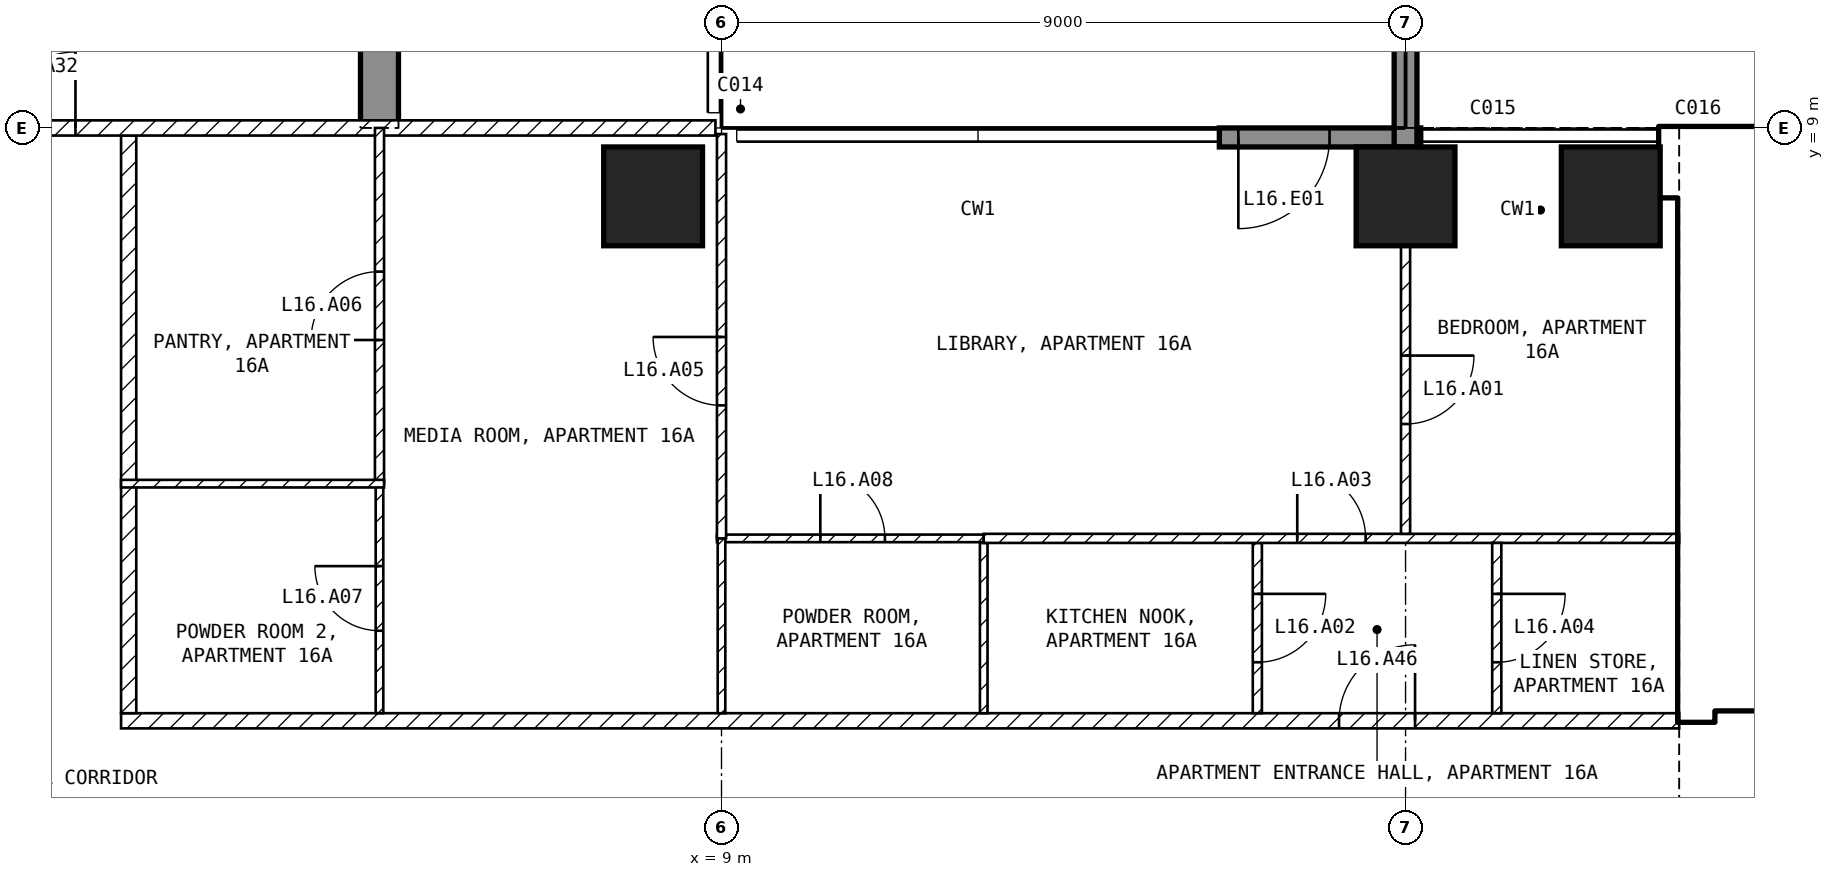
"""IFC4 building model, lengths in metres.
Left out: names, types, materials, properties, quantities, classifications, styles, units other than length and angle.
Written with IfcOpenShell. Run it as: python <this file> out.ifc"""

import sys

from ifc_helpers import new_model, si_unit, direction, frame, frame_2d, origin, origin_2d, place, context, subcontext, project, spatial, polyline, rectangle, outline, extrude, element, fill, save


model = new_model("IFC4")
c1 = context("Model", 3, precision=1e-05, world=origin(), true_north=direction((0.0, 1.0)))
c2 = subcontext(c1, "Body", "Model", "MODEL_VIEW")
j1 = project(units=[si_unit("LENGTHUNIT", "METRE"), si_unit("PLANEANGLEUNIT", "RADIAN")], contexts=[c1])
p1 = place(None, origin())
s1 = spatial("IfcSite", under=j1, at=p1, CompositionType="ELEMENT")
p2 = place(p1, origin())
s2 = spatial("IfcBuilding", under=s1, at=p2, CompositionType="ELEMENT")
p3 = place(p2, frame((0.0, 0.0, 75.0)))
s3 = spatial("IfcBuildingStorey", under=s2, at=p3, CompositionType="ELEMENT", Elevation=75.0)
for number, where, z_axis, x_axis in (
    (1, (8.1, 8.1, -0.25), (0.0, 0.0, 1.0), (1.0, 0.0, 0.0)),
    (2, (18.0, 8.1, -0.25), (0.0, 0.0, 1.0), (1.0, 0.0, 0.0)),
    (3, (20.7, 8.1, -0.25), (0.0, 0.0, 1.0), (1.0, 0.0, 0.0)),
):
    element("IfcColumn", number, at=place(p3, frame(where, z_axis=z_axis, x_axis=x_axis)), inside=s3, PredefinedType="COLUMN", context=c2, shape_type="SweptSolid", body=[
        extrude(rectangle(XDim=1.3, YDim=1.3, at=origin_2d()), origin(), (0.0, 0.0, 1.0), 3.5),
    ])
p4 = place(p3, frame((4.25, 9.0, -0.25), z_axis=(1.0, 0.0, 0.0), x_axis=(0.0, 1.0, 0.0)))
e4 = element("IfcWall", 4, at=p4, inside=s3, PredefinedType="SHEAR", context=c2, shape_type="SweptSolid", body=[
    extrude(outline(polyline([(0.0, 0.0), (2.1, 0.0), (2.1, 2.65), (4.5, 2.65), (4.5, 0.0), (9.9, 0.0), (9.9, 2.65), (12.3, 2.65), (12.3, 0.0), (16.45, 0.0), (16.45, 3.5), (0.0, 3.5), (0.0, 0.0)])), origin(), (0.0, 0.0, 1.0), 0.5),
])
p5 = place(p3, frame((18.2, 8.875, 0.0), z_axis=(0.0, 0.0, 1.0), x_axis=(-1.0, 0.0, 0.0)))
e5 = element("IfcWall", 5, at=p5, inside=s3, PredefinedType="SOLIDWALL", context=c2, shape_type="SweptSolid", body=[
    extrude(rectangle(XDim=2.65, YDim=0.25, at=frame_2d((1.325, 0.0))), origin(), (0.0, 0.0, 1.0), 3.25),
])
p6 = place(p5, frame((1.2, 0.0, 0.0)))
e6 = element("IfcOpeningElement", 6, at=p6, cuts=e5, PredefinedType="OPENING", context=c2, shape_type="SweptSolid", body=[
    extrude(rectangle(XDim=1.2, YDim=2.4, at=frame_2d((0.6, 1.2))), frame((0.0, 0.135, 0.0), z_axis=(0.0, -1.0, 0.0), x_axis=(1.0, 0.0, 0.0)), (0.0, 0.0, 1.0), 0.27),
])
p7 = place(p3, frame((18.0, 8.75, 0.0), z_axis=(0.0, 0.0, 1.0), x_axis=(0.0, 1.0, 0.0)))
e7 = element("IfcWall", 7, at=p7, inside=s3, PredefinedType="SOLIDWALL", context=c2, shape_type="SweptSolid", body=[
    extrude(rectangle(XDim=2.95, YDim=0.3, at=frame_2d((1.475, 0.0))), origin(), (0.0, 0.0, 1.0), 3.25),
])
p8 = place(p3, frame((21.35, 8.55, 0.0), z_axis=(0.0, 0.0, 1.0), x_axis=(1.0, 0.0, 0.0)))
e8 = element("IfcWall", 8, at=p8, inside=s3, PredefinedType="SHEAR", context=c2, shape_type="SweptSolid", body=[
    extrude(rectangle(XDim=10.15, YDim=0.9, at=frame_2d((5.075, 0.0))), origin(), (0.0, 0.0, 1.0), 3.25),
])
p9 = place(p3, frame((21.825, 1.2, 0.0), z_axis=(0.0, 0.0, 1.0), x_axis=(0.0, 1.0, 0.0)))
e9 = element("IfcWall", 9, at=p9, inside=s3, PredefinedType="SHEAR", context=c2, shape_type="SweptSolid", body=[
    extrude(rectangle(XDim=6.9, YDim=0.45, at=frame_2d((3.45, 0.0))), origin(), (0.0, 0.0, 1.0), 3.25),
])
p10 = place(p3, frame((22.05, 1.45, 0.0), z_axis=(0.0, 0.0, 1.0), x_axis=(1.0, 0.0, 0.0)))
e10 = element("IfcWall", 10, at=p10, inside=s3, PredefinedType="SOLIDWALL", context=c2, shape_type="SweptSolid", body=[
    extrude(rectangle(XDim=13.05, YDim=0.2, at=frame_2d((6.525, 0.0))), origin(), (0.0, 0.0, 1.0), 3.25),
])
p11 = place(p10, frame((0.75, 0.0, 0.0)))
e11 = element("IfcOpeningElement", 11, at=p11, cuts=e10, PredefinedType="OPENING", context=c2, shape_type="SweptSolid", body=[
    extrude(rectangle(XDim=1.0, YDim=2.1, at=frame_2d((0.5, 1.05))), frame((0.0, 0.11, 0.0), z_axis=(0.0, -1.0, 0.0), x_axis=(1.0, 0.0, 0.0)), (0.0, 0.0, 1.0), 0.22),
])
p12 = place(p10, frame((3.25, 0.0, 0.0)))
e12 = element("IfcOpeningElement", 12, at=p12, cuts=e10, PredefinedType="OPENING", context=c2, shape_type="SweptSolid", body=[
    extrude(rectangle(XDim=1.0, YDim=2.1, at=frame_2d((0.5, 1.05))), frame((0.0, 0.11, 0.0), z_axis=(0.0, -1.0, 0.0), x_axis=(1.0, 0.0, 0.0)), (0.0, 0.0, 1.0), 0.22),
])
p13 = place(p3, frame((22.05, 5.15, 0.0), z_axis=(0.0, 0.0, 1.0), x_axis=(1.0, 0.0, 0.0)))
e13 = element("IfcWall", 13, at=p13, inside=s3, PredefinedType="SOLIDWALL", context=c2, shape_type="SweptSolid", body=[
    extrude(rectangle(XDim=6.3, YDim=0.2, at=frame_2d((3.15, 0.0))), origin(), (0.0, 0.0, 1.0), 3.25),
])
p14 = place(p13, frame((0.2, 0.0, 0.0)))
e14 = element("IfcOpeningElement", 14, at=p14, cuts=e13, PredefinedType="OPENING", context=c2, shape_type="SweptSolid", body=[
    extrude(rectangle(XDim=1.0, YDim=2.1, at=frame_2d((0.5, 1.05))), frame((0.0, 0.11, 0.0), z_axis=(0.0, -1.0, 0.0), x_axis=(1.0, 0.0, 0.0)), (0.0, 0.0, 1.0), 0.22),
])
p15 = place(p3, frame((1.1, 1.2, 0.0), z_axis=(0.0, 0.0, 1.0), x_axis=(1.0, 0.0, 0.0)))
e15 = element("IfcWall", 15, at=p15, inside=s3, PredefinedType="PARTITIONING", context=c2, shape_type="SweptSolid", body=[
    extrude(rectangle(XDim=20.5, YDim=0.2, at=frame_2d((10.25, 0.0))), origin(), (0.0, 0.0, 1.0), 3.25),
])
p16 = place(p15, frame((16.025, 0.0, 0.0)))
e16 = element("IfcOpeningElement", 16, at=p16, cuts=e15, PredefinedType="OPENING", context=c2, shape_type="SweptSolid", body=[
    extrude(rectangle(XDim=1.0, YDim=2.1, at=frame_2d((0.5, 1.05))), frame((0.0, 0.11, 0.0), z_axis=(0.0, -1.0, 0.0), x_axis=(1.0, 0.0, 0.0)), (0.0, 0.0, 1.0), 0.22),
])
p17 = place(p3, frame((1.2, 8.9, 0.0), z_axis=(0.0, 0.0, 1.0), x_axis=(0.0, -1.0, 0.0)))
e17 = element("IfcWall", 17, at=p17, inside=s3, PredefinedType="PARTITIONING", context=c2, shape_type="SweptSolid", body=[
    extrude(rectangle(XDim=7.6, YDim=0.2, at=frame_2d((3.8, 0.0))), origin(), (0.0, 0.0, 1.0), 3.25),
])
p18 = place(p3, frame((-8.92, 9.0, 0.0), z_axis=(0.0, 0.0, 1.0), x_axis=(1.0, 0.0, 0.0)))
e18 = element("IfcWall", 18, at=p18, inside=s3, PredefinedType="PARTITIONING", context=c2, shape_type="SweptSolid", body=[
    extrude(rectangle(XDim=17.84, YDim=0.2, at=frame_2d((8.92, 0.0))), origin(), (0.0, 0.0, 1.0), 3.25),
])
p19 = place(p18, frame((8.42, 0.0, 0.0)))
e19 = element("IfcOpeningElement", 19, at=p19, cuts=e18, PredefinedType="OPENING", context=c2, shape_type="SweptSolid", body=[
    extrude(rectangle(XDim=1.0, YDim=2.1, at=frame_2d((0.5, 1.05))), frame((0.0, 0.11, 0.0), z_axis=(0.0, -1.0, 0.0), x_axis=(1.0, 0.0, 0.0)), (0.0, 0.0, 1.0), 0.22),
])
p20 = place(p3, frame((12.45, 3.54, 0.0), z_axis=(0.0, 0.0, 1.0), x_axis=(0.0, -1.0, 0.0)))
e20 = element("IfcWall", 20, at=p20, inside=s3, PredefinedType="PARTITIONING", context=c2, shape_type="SweptSolid", body=[
    extrude(rectangle(XDim=2.24, YDim=0.1, at=frame_2d((1.12, 0.0))), origin(), (0.0, 0.0, 1.0), 3.25),
])
p21 = place(p3, frame((8.94, 3.6, 0.0), z_axis=(0.0, 0.0, 1.0), x_axis=(1.0, 0.0, 0.0)))
e21 = element("IfcWall", 21, at=p21, inside=s3, PredefinedType="PARTITIONING", context=c2, shape_type="SweptSolid", body=[
    extrude(rectangle(XDim=3.51, YDim=0.1, at=frame_2d((1.755, 0.0))), origin(), (0.0, 0.0, 1.0), 3.25),
])
p22 = place(p21, frame((1.36, 0.0, 0.0)))
e22 = element("IfcOpeningElement", 22, at=p22, cuts=e21, PredefinedType="OPENING", context=c2, shape_type="SweptSolid", body=[
    extrude(rectangle(XDim=0.85, YDim=2.1, at=frame_2d((0.425, 1.05))), frame((0.0, 0.06, 0.0), z_axis=(0.0, -1.0, 0.0), x_axis=(1.0, 0.0, 0.0)), (0.0, 0.0, 1.0), 0.12),
])
p23 = place(p3, frame((9.0, 1.3, 0.0), z_axis=(0.0, 0.0, 1.0), x_axis=(0.0, 1.0, 0.0)))
e23 = element("IfcWall", 23, at=p23, inside=s3, PredefinedType="PARTITIONING", context=c2, shape_type="SweptSolid", body=[
    extrude(rectangle(XDim=2.3, YDim=0.1, at=frame_2d((1.15, 0.0))), origin(), (0.0, 0.0, 1.0), 3.25),
])
p24 = place(p3, frame((16.05, 3.54, 0.0), z_axis=(0.0, 0.0, 1.0), x_axis=(0.0, -1.0, 0.0)))
e24 = element("IfcWall", 24, at=p24, inside=s3, PredefinedType="PARTITIONING", context=c2, shape_type="SweptSolid", body=[
    extrude(rectangle(XDim=2.24, YDim=0.12, at=frame_2d((1.12, 0.0))), origin(), (0.0, 0.0, 1.0), 3.25),
])
p25 = place(p24, frame((0.67, 0.0, 0.0)))
e25 = element("IfcOpeningElement", 25, at=p25, cuts=e24, PredefinedType="OPENING", context=c2, shape_type="SweptSolid", body=[
    extrude(rectangle(XDim=0.9, YDim=2.1, at=frame_2d((0.45, 1.05))), frame((0.0, 0.07, 0.0), z_axis=(0.0, -1.0, 0.0), x_axis=(1.0, 0.0, 0.0)), (0.0, 0.0, 1.0), 0.14),
])
p26 = place(p3, frame((12.45, 3.6, 0.0), z_axis=(0.0, 0.0, 1.0), x_axis=(1.0, 0.0, 0.0)))
e26 = element("IfcWall", 26, at=p26, inside=s3, PredefinedType="PARTITIONING", context=c2, shape_type="SweptSolid", body=[
    extrude(rectangle(XDim=9.15, YDim=0.12, at=frame_2d((4.575, 0.0))), origin(), (0.0, 0.0, 1.0), 3.25),
])
p27 = place(p26, frame((4.125, 0.0, 0.0)))
e27 = element("IfcOpeningElement", 27, at=p27, cuts=e26, PredefinedType="OPENING", context=c2, shape_type="SweptSolid", body=[
    extrude(rectangle(XDim=0.9, YDim=2.1, at=frame_2d((0.45, 1.05))), frame((0.0, 0.07, 0.0), z_axis=(0.0, -1.0, 0.0), x_axis=(1.0, 0.0, 0.0)), (0.0, 0.0, 1.0), 0.14),
])
p28 = place(p3, frame((19.2, 3.54, 0.0), z_axis=(0.0, 0.0, 1.0), x_axis=(0.0, -1.0, 0.0)))
e28 = element("IfcWall", 28, at=p28, inside=s3, PredefinedType="PARTITIONING", context=c2, shape_type="SweptSolid", body=[
    extrude(rectangle(XDim=2.24, YDim=0.12, at=frame_2d((1.12, 0.0))), origin(), (0.0, 0.0, 1.0), 3.25),
])
p29 = place(p28, frame((0.67, 0.0, 0.0)))
e29 = element("IfcOpeningElement", 29, at=p29, cuts=e28, PredefinedType="OPENING", context=c2, shape_type="SweptSolid", body=[
    extrude(rectangle(XDim=0.9, YDim=2.1, at=frame_2d((0.45, 1.05))), frame((0.0, 0.07, 0.0), z_axis=(0.0, -1.0, 0.0), x_axis=(1.0, 0.0, 0.0)), (0.0, 0.0, 1.0), 0.14),
])
p30 = place(p3, frame((18.0, 7.45, 0.0), z_axis=(0.0, 0.0, 1.0), x_axis=(0.0, -1.0, 0.0)))
e30 = element("IfcWall", 30, at=p30, inside=s3, PredefinedType="PARTITIONING", context=c2, shape_type="SweptSolid", body=[
    extrude(rectangle(XDim=3.79, YDim=0.12, at=frame_2d((1.895, 0.0))), origin(), (0.0, 0.0, 1.0), 2.346),
])
p31 = place(p30, frame((1.445, 0.0, 0.0)))
e31 = element("IfcOpeningElement", 31, at=p31, cuts=e30, PredefinedType="OPENING", context=c2, shape_type="SweptSolid", body=[
    extrude(rectangle(XDim=0.9, YDim=2.1, at=frame_2d((0.45, 1.05))), frame((0.0, 0.07, 0.0), z_axis=(0.0, -1.0, 0.0), x_axis=(1.0, 0.0, 0.0)), (0.0, 0.0, 1.0), 0.14),
])
p32 = place(p3, frame((9.0, 3.6, 0.0), z_axis=(0.0, 0.0, 1.0), x_axis=(0.0, 1.0, 0.0)))
e32 = element("IfcWall", 32, at=p32, inside=s3, PredefinedType="PARTITIONING", context=c2, shape_type="SweptSolid", body=[
    extrude(rectangle(XDim=5.32, YDim=0.12, at=frame_2d((2.66, 0.0))), origin(), (0.0, 0.0, 1.0), 3.25),
])
p33 = place(p32, frame((1.75, 0.0, 0.0)))
e33 = element("IfcOpeningElement", 33, at=p33, cuts=e32, PredefinedType="OPENING", context=c2, shape_type="SweptSolid", body=[
    extrude(rectangle(XDim=0.9, YDim=2.1, at=frame_2d((0.45, 1.05))), frame((0.0, 0.07, 0.0), z_axis=(0.0, -1.0, 0.0), x_axis=(1.0, 0.0, 0.0)), (0.0, 0.0, 1.0), 0.14),
])
p34 = place(p3, frame((4.5, 1.3, 0.0), z_axis=(0.0, 0.0, 1.0), x_axis=(0.0, 1.0, 0.0)))
e34 = element("IfcWall", 34, at=p34, inside=s3, PredefinedType="PARTITIONING", context=c2, shape_type="SweptSolid", body=[
    extrude(rectangle(XDim=3.02, YDim=0.1, at=frame_2d((1.51, 0.0))), origin(), (0.0, 0.0, 1.0), 3.25),
])
p35 = place(p34, frame((1.085, 0.0, 0.0)))
e35 = element("IfcOpeningElement", 35, at=p35, cuts=e34, PredefinedType="OPENING", context=c2, shape_type="SweptSolid", body=[
    extrude(rectangle(XDim=0.85, YDim=2.1, at=frame_2d((0.425, 1.05))), frame((0.0, 0.06, 0.0), z_axis=(0.0, -1.0, 0.0), x_axis=(1.0, 0.0, 0.0)), (0.0, 0.0, 1.0), 0.12),
])
p36 = place(p3, frame((4.5, 4.32, 0.0), z_axis=(0.0, 0.0, 1.0), x_axis=(0.0, 1.0, 0.0)))
e36 = element("IfcWall", 36, at=p36, inside=s3, PredefinedType="PARTITIONING", context=c2, shape_type="SweptSolid", body=[
    extrude(rectangle(XDim=4.68, YDim=0.12, at=frame_2d((2.34, 0.0))), origin(), (0.0, 0.0, 1.0), 3.25),
])
p37 = place(p36, frame((1.89, 0.0, 0.0)))
e37 = element("IfcOpeningElement", 37, at=p37, cuts=e36, PredefinedType="OPENING", context=c2, shape_type="SweptSolid", body=[
    extrude(rectangle(XDim=0.9, YDim=2.1, at=frame_2d((0.45, 1.05))), frame((0.0, 0.07, 0.0), z_axis=(0.0, -1.0, 0.0), x_axis=(1.0, 0.0, 0.0)), (0.0, 0.0, 1.0), 0.14),
])
p38 = place(p3, frame((1.1, 4.32, 0.0), z_axis=(0.0, 0.0, 1.0), x_axis=(1.0, 0.0, 0.0)))
e38 = element("IfcWall", 38, at=p38, inside=s3, PredefinedType="PARTITIONING", context=c2, shape_type="SweptSolid", body=[
    extrude(rectangle(XDim=3.46, YDim=0.1, at=frame_2d((1.73, 0.0))), origin(), (0.0, 0.0, 1.0), 3.25),
])
p39 = place(p6, origin())
e39 = element("IfcDoor", 39, at=p39, inside=s3, OperationType="SINGLE_SWING_RIGHT", PredefinedType="DOOR", context=c2, shape_type="SweptSolid", body=[
    extrude(rectangle(XDim=1.2, YDim=2.4, at=frame_2d((0.6, 1.2))), frame((0.0, 0.025, 0.0), z_axis=(0.0, -1.0, 0.0), x_axis=(1.0, 0.0, 0.0)), (0.0, 0.0, 1.0), 0.05),
])
fill(e6, e39)
p40 = place(p14, origin())
e40 = element("IfcDoor", 40, at=p40, inside=s3, OperationType="SINGLE_SWING_LEFT", PredefinedType="DOOR", context=c2, shape_type="SweptSolid", body=[
    extrude(rectangle(XDim=1.0, YDim=2.1, at=frame_2d((0.5, 1.05))), frame((0.0, 0.025, 0.0), z_axis=(0.0, -1.0, 0.0), x_axis=(1.0, 0.0, 0.0)), (0.0, 0.0, 1.0), 0.05),
])
fill(e14, e40)
p41 = place(p31, origin())
e41 = element("IfcDoor", 41, at=p41, inside=s3, OperationType="SINGLE_SWING_LEFT", PredefinedType="DOOR", context=c2, shape_type="SweptSolid", body=[
    extrude(rectangle(XDim=0.9, YDim=2.1, at=frame_2d((0.45, 1.05))), frame((0.0, 0.025, 0.0), z_axis=(0.0, -1.0, 0.0), x_axis=(1.0, 0.0, 0.0)), (0.0, 0.0, 1.0), 0.05),
])
fill(e31, e41)
p42 = place(p25, origin())
e42 = element("IfcDoor", 42, at=p42, inside=s3, OperationType="SINGLE_SWING_LEFT", PredefinedType="DOOR", context=c2, shape_type="SweptSolid", body=[
    extrude(rectangle(XDim=0.9, YDim=2.1, at=frame_2d((0.45, 1.05))), frame((0.0, 0.025, 0.0), z_axis=(0.0, -1.0, 0.0), x_axis=(1.0, 0.0, 0.0)), (0.0, 0.0, 1.0), 0.05),
])
fill(e25, e42)
p43 = place(p27, origin())
e43 = element("IfcDoor", 43, at=p43, inside=s3, OperationType="SINGLE_SWING_LEFT", PredefinedType="DOOR", context=c2, shape_type="SweptSolid", body=[
    extrude(rectangle(XDim=0.9, YDim=2.1, at=frame_2d((0.45, 1.05))), frame((0.0, 0.025, 0.0), z_axis=(0.0, -1.0, 0.0), x_axis=(1.0, 0.0, 0.0)), (0.0, 0.0, 1.0), 0.05),
])
fill(e27, e43)
p44 = place(p29, origin())
e44 = element("IfcDoor", 44, at=p44, inside=s3, OperationType="SINGLE_SWING_LEFT", PredefinedType="DOOR", context=c2, shape_type="SweptSolid", body=[
    extrude(rectangle(XDim=0.9, YDim=2.1, at=frame_2d((0.45, 1.05))), frame((0.0, 0.025, 0.0), z_axis=(0.0, -1.0, 0.0), x_axis=(1.0, 0.0, 0.0)), (0.0, 0.0, 1.0), 0.05),
])
fill(e29, e44)
p45 = place(p33, origin())
e45 = element("IfcDoor", 45, at=p45, inside=s3, OperationType="SINGLE_SWING_RIGHT", PredefinedType="DOOR", context=c2, shape_type="SweptSolid", body=[
    extrude(rectangle(XDim=0.9, YDim=2.1, at=frame_2d((0.45, 1.05))), frame((0.0, 0.025, 0.0), z_axis=(0.0, -1.0, 0.0), x_axis=(1.0, 0.0, 0.0)), (0.0, 0.0, 1.0), 0.05),
])
fill(e33, e45)
p46 = place(p37, origin())
e46 = element("IfcDoor", 46, at=p46, inside=s3, OperationType="SINGLE_SWING_LEFT", PredefinedType="DOOR", context=c2, shape_type="SweptSolid", body=[
    extrude(rectangle(XDim=0.9, YDim=2.1, at=frame_2d((0.45, 1.05))), frame((0.0, 0.025, 0.0), z_axis=(0.0, -1.0, 0.0), x_axis=(1.0, 0.0, 0.0)), (0.0, 0.0, 1.0), 0.05),
])
fill(e37, e46)
p47 = place(p35, origin())
e47 = element("IfcDoor", 47, at=p47, inside=s3, OperationType="SINGLE_SWING_RIGHT", PredefinedType="DOOR", context=c2, shape_type="SweptSolid", body=[
    extrude(rectangle(XDim=0.85, YDim=2.1, at=frame_2d((0.425, 1.05))), frame((0.0, 0.025, 0.0), z_axis=(0.0, -1.0, 0.0), x_axis=(1.0, 0.0, 0.0)), (0.0, 0.0, 1.0), 0.05),
])
fill(e35, e47)
p48 = place(p22, origin())
e48 = element("IfcDoor", 48, at=p48, inside=s3, OperationType="SINGLE_SWING_LEFT", PredefinedType="DOOR", context=c2, shape_type="SweptSolid", body=[
    extrude(rectangle(XDim=0.85, YDim=2.1, at=frame_2d((0.425, 1.05))), frame((0.0, 0.025, 0.0), z_axis=(0.0, -1.0, 0.0), x_axis=(1.0, 0.0, 0.0)), (0.0, 0.0, 1.0), 0.05),
])
fill(e22, e48)
p49 = place(p19, origin())
e49 = element("IfcDoor", 49, at=p49, inside=s3, OperationType="SINGLE_SWING_RIGHT", PredefinedType="DOOR", context=c2, shape_type="SweptSolid", body=[
    extrude(rectangle(XDim=1.0, YDim=2.1, at=frame_2d((0.5, 1.05))), frame((0.0, 0.025, 0.0), z_axis=(0.0, -1.0, 0.0), x_axis=(1.0, 0.0, 0.0)), (0.0, 0.0, 1.0), 0.05),
])
fill(e19, e49)
p50 = place(p16, origin())
e50 = element("IfcDoor", 50, at=p50, inside=s3, OperationType="SINGLE_SWING_RIGHT", PredefinedType="DOOR", context=c2, shape_type="SweptSolid", body=[
    extrude(rectangle(XDim=1.0, YDim=2.1, at=frame_2d((0.5, 1.05))), frame((0.0, 0.025, 0.0), z_axis=(0.0, -1.0, 0.0), x_axis=(1.0, 0.0, 0.0)), (0.0, 0.0, 1.0), 0.05),
])
fill(e16, e50)
save(model, sys.argv[1])
